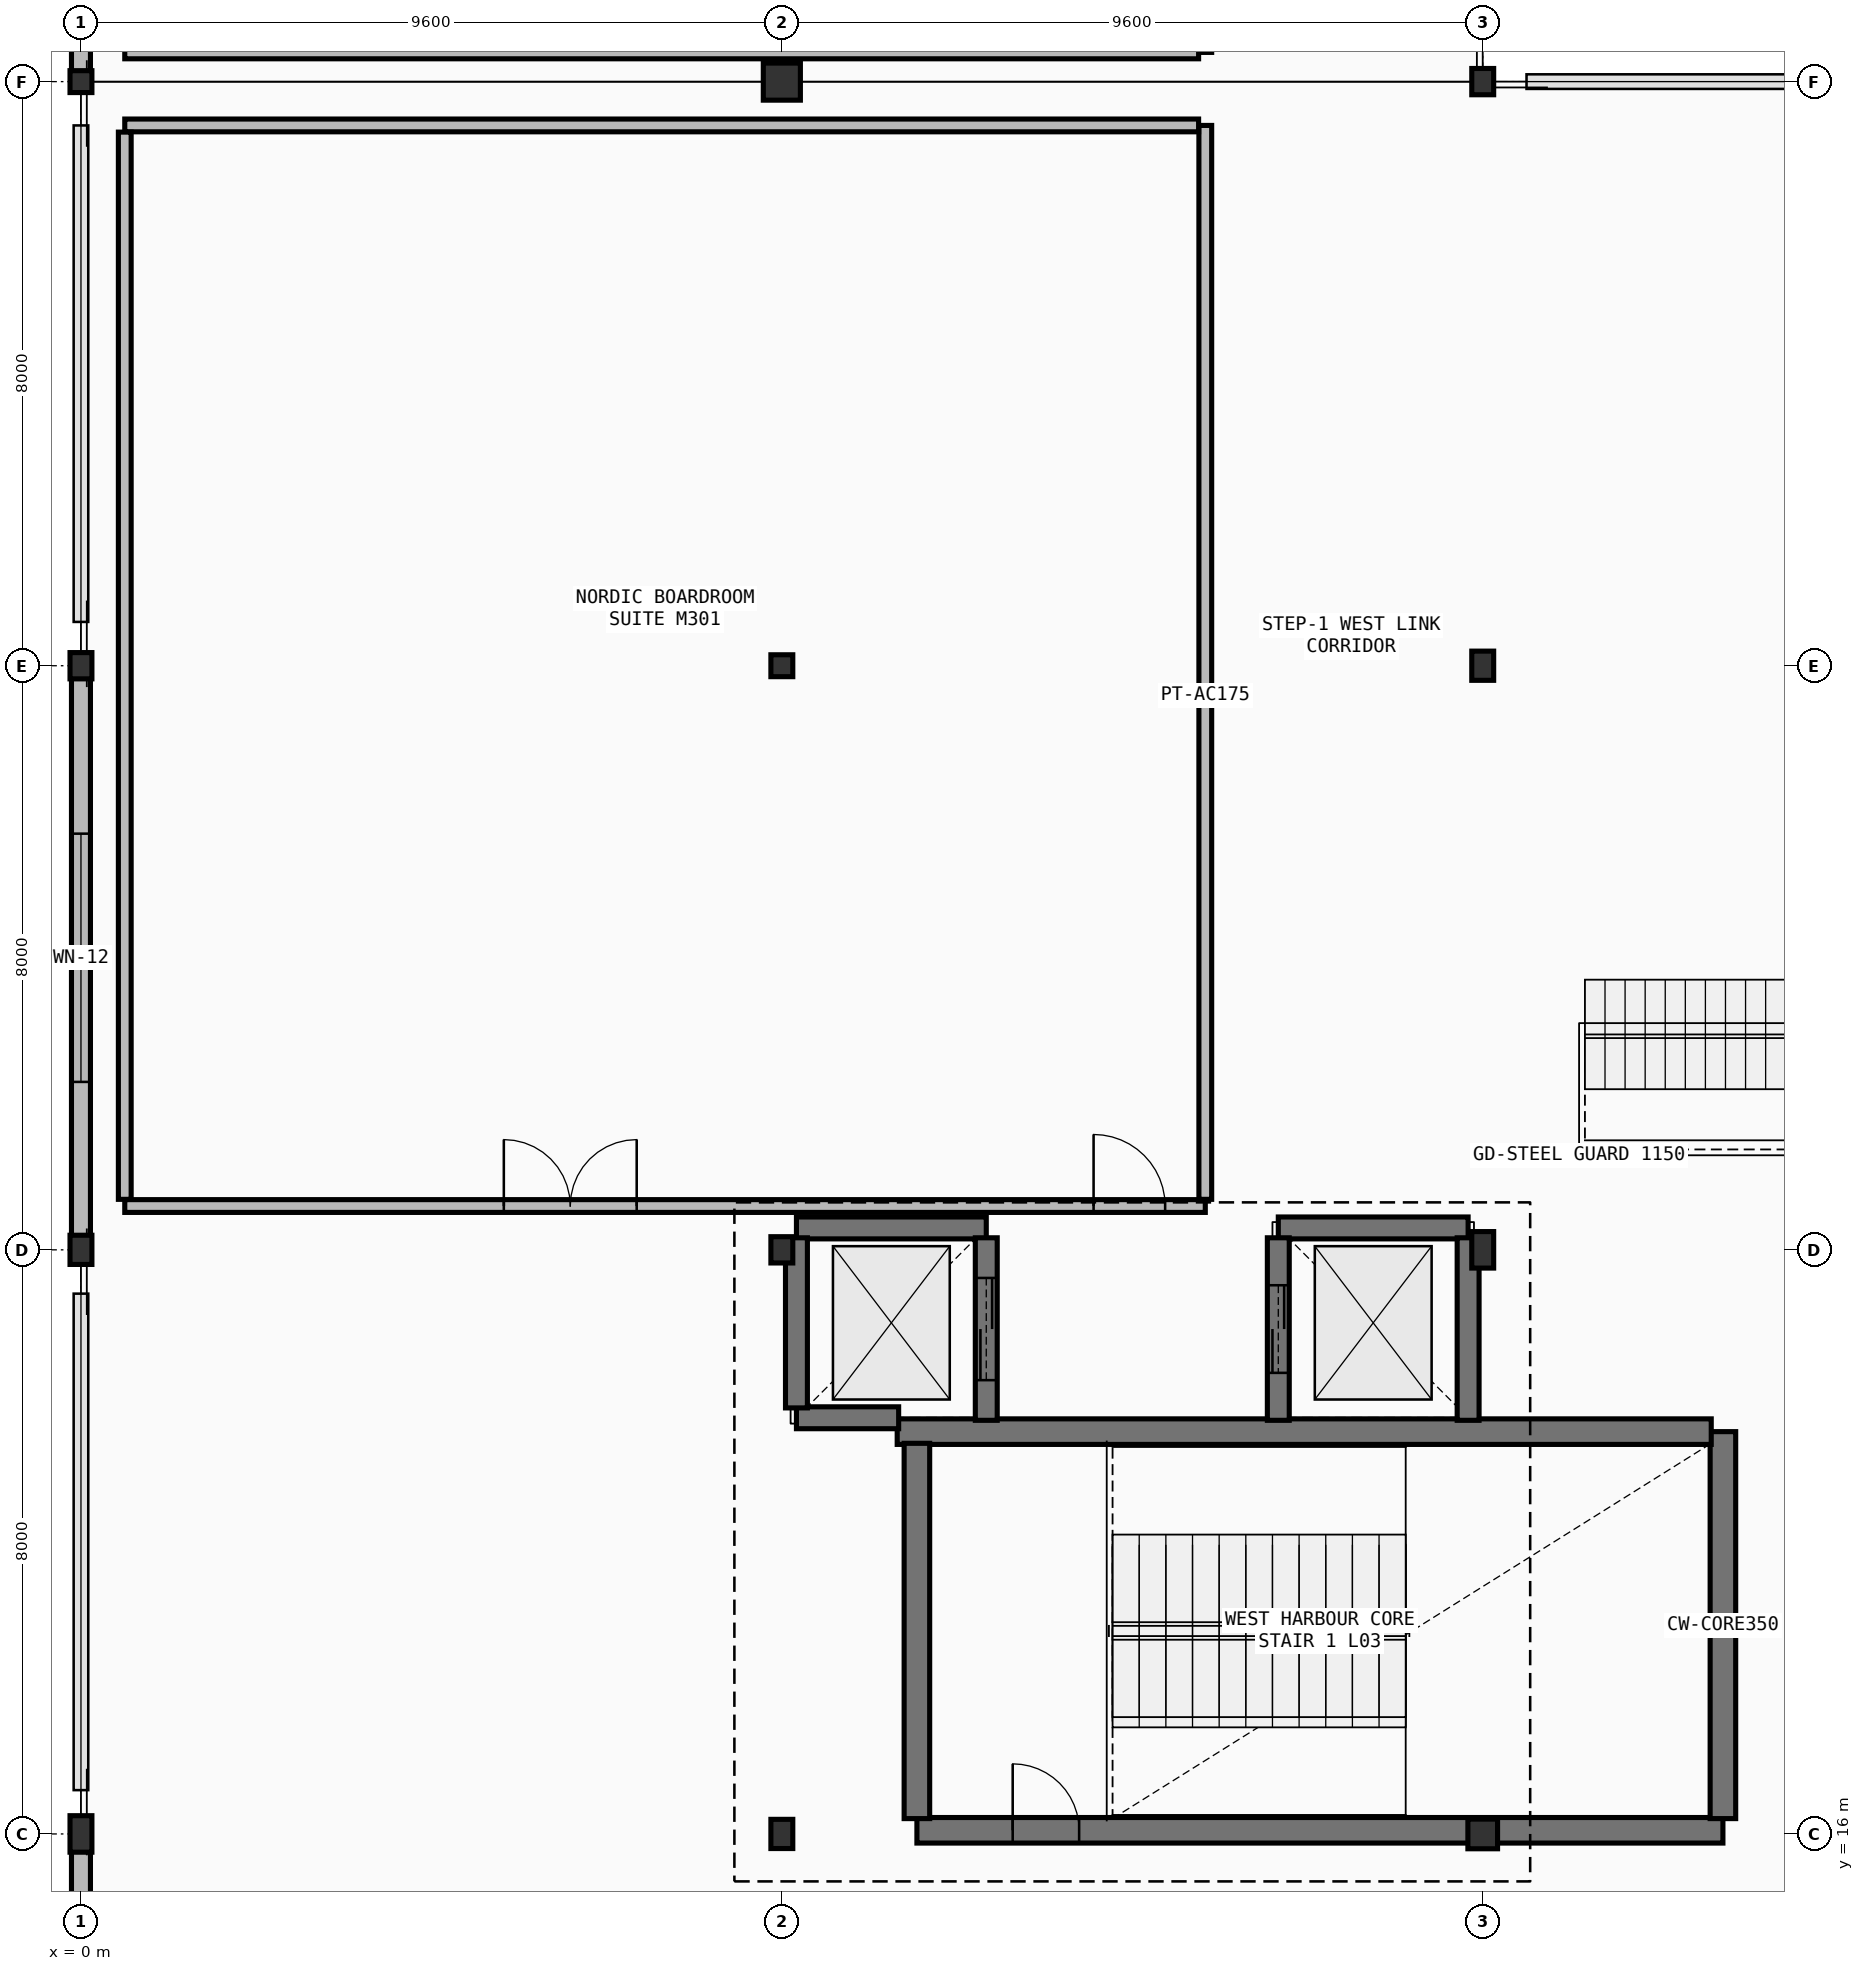
"""IFC4 building model, lengths in metres.
Left out: names, types, materials, properties, quantities, classifications, styles, units other than length and angle.
Written with IfcOpenShell. Run it as: python <this file> out.ifc"""

import sys

from ifc_helpers import new_model, si_unit, direction, frame, frame_2d, origin, origin_2d, place, context, subcontext, project, spatial, rectangle, hollow_circle, i_section, extrude, element, fill, save


model = new_model("IFC4")
c1 = context("Model", 3, precision=1e-05, world=origin(), true_north=direction((0.0, 1.0)))
c2 = subcontext(c1, "Body", "Model", "MODEL_VIEW")
j1 = project(units=[si_unit("LENGTHUNIT", "METRE"), si_unit("PLANEANGLEUNIT", "RADIAN")], contexts=[c1])
p1 = place(None, origin())
s1 = spatial("IfcSite", under=j1, at=p1, CompositionType="ELEMENT")
p2 = place(p1, origin())
s2 = spatial("IfcBuilding", under=s1, at=p2, CompositionType="ELEMENT")
p3 = place(p2, frame((0.0, 0.0, 15.9)))
s3 = spatial("IfcBuildingStorey", under=s2, at=p3, CompositionType="ELEMENT", Elevation=15.9)
p4 = place(p3, frame((0.0, 16.0, 0.0), z_axis=(0.0, 0.0, 1.0), x_axis=(1.0, 0.0, 0.0)))
e1 = element("IfcColumn", 1, at=p4, inside=s3, PredefinedType="COLUMN", context=c2, shape_type="SweptSolid", body=[
    extrude(i_section(OverallWidth=0.3, OverallDepth=0.5, WebThickness=0.014, FlangeThickness=0.028, FilletRadius=0.027, at=origin_2d()), origin(), (0.0, 0.0, 1.0), 4.5),
])
p5 = place(p3, frame((0.0, 24.0, 0.0), z_axis=(0.0, 0.0, 1.0), x_axis=(1.0, 0.0, 0.0)))
e2 = element("IfcColumn", 2, at=p5, inside=s3, PredefinedType="COLUMN", context=c2, shape_type="SweptSolid", body=[
    extrude(i_section(OverallWidth=0.3, OverallDepth=0.4, WebThickness=0.013, FlangeThickness=0.024, FilletRadius=0.027, at=origin_2d()), origin(), (0.0, 0.0, 1.0), 4.5),
])
p6 = place(p3, frame((0.0, 32.0, 0.0), z_axis=(0.0, 0.0, 1.0), x_axis=(1.0, 0.0, 0.0)))
e3 = element("IfcColumn", 3, at=p6, inside=s3, PredefinedType="COLUMN", context=c2, shape_type="SweptSolid", body=[
    extrude(i_section(OverallWidth=0.3, OverallDepth=0.36, WebThickness=0.012, FlangeThickness=0.022, FilletRadius=0.027, at=origin_2d()), origin(), (0.0, 0.0, 1.0), 4.5),
])
p7 = place(p3, frame((0.0, 40.0, 0.0), z_axis=(0.0, 0.0, 1.0), x_axis=(1.0, 0.0, 0.0)))
e4 = element("IfcColumn", 4, at=p7, inside=s3, PredefinedType="COLUMN", context=c2, shape_type="SweptSolid", body=[
    extrude(i_section(OverallWidth=0.3, OverallDepth=0.3, WebThickness=0.011, FlangeThickness=0.019, FilletRadius=0.027, at=origin_2d()), origin(), (0.0, 0.0, 1.0), 4.5),
])
p8 = place(p3, frame((9.6, 16.0, 0.0), z_axis=(0.0, 0.0, 1.0), x_axis=(1.0, 0.0, 0.0)))
e5 = element("IfcColumn", 5, at=p8, inside=s3, PredefinedType="COLUMN", context=c2, shape_type="SweptSolid", body=[
    extrude(i_section(OverallWidth=0.3, OverallDepth=0.4, WebThickness=0.013, FlangeThickness=0.024, FilletRadius=0.027, at=origin_2d()), origin(), (0.0, 0.0, 1.0), 4.5),
])
p9 = place(p3, frame((9.6, 24.0, 0.0), z_axis=(0.0, 0.0, 1.0), x_axis=(1.0, 0.0, 0.0)))
e6 = element("IfcColumn", 6, at=p9, inside=s3, PredefinedType="COLUMN", context=c2, shape_type="SweptSolid", body=[
    extrude(i_section(OverallWidth=0.3, OverallDepth=0.36, WebThickness=0.012, FlangeThickness=0.022, FilletRadius=0.027, at=origin_2d()), origin(), (0.0, 0.0, 1.0), 4.5),
])
p10 = place(p3, frame((9.6, 32.0, 0.0), z_axis=(0.0, 0.0, 1.0), x_axis=(1.0, 0.0, 0.0)))
e7 = element("IfcColumn", 7, at=p10, inside=s3, PredefinedType="COLUMN", context=c2, shape_type="SweptSolid", body=[
    extrude(i_section(OverallWidth=0.3, OverallDepth=0.3, WebThickness=0.011, FlangeThickness=0.019, FilletRadius=0.027, at=origin_2d()), origin(), (0.0, 0.0, 1.0), 4.5),
])
p11 = place(p3, frame((9.6, 40.0, 0.0), z_axis=(0.0, 0.0, 1.0), x_axis=(1.0, 0.0, 0.0)))
e8 = element("IfcColumn", 8, at=p11, inside=s3, PredefinedType="COLUMN", context=c2, shape_type="SweptSolid", body=[
    extrude(hollow_circle(Radius=0.254, WallThickness=0.025, at=origin_2d()), origin(), (0.0, 0.0, 1.0), 4.5),
])
p12 = place(p3, frame((19.2, 16.0, 0.0), z_axis=(0.0, 0.0, 1.0), x_axis=(1.0, 0.0, 0.0)))
e9 = element("IfcColumn", 9, at=p12, inside=s3, PredefinedType="COLUMN", context=c2, shape_type="SweptSolid", body=[
    extrude(hollow_circle(Radius=0.203, WallThickness=0.02, at=origin_2d()), origin(), (0.0, 0.0, 1.0), 4.5),
])
p13 = place(p3, frame((19.2, 24.0, 0.0), z_axis=(0.0, 0.0, 1.0), x_axis=(1.0, 0.0, 0.0)))
e10 = element("IfcColumn", 10, at=p13, inside=s3, PredefinedType="COLUMN", context=c2, shape_type="SweptSolid", body=[
    extrude(i_section(OverallWidth=0.3, OverallDepth=0.5, WebThickness=0.014, FlangeThickness=0.028, FilletRadius=0.027, at=origin_2d()), origin(), (0.0, 0.0, 1.0), 4.5),
])
p14 = place(p3, frame((19.2, 32.0, 0.0), z_axis=(0.0, 0.0, 1.0), x_axis=(1.0, 0.0, 0.0)))
e11 = element("IfcColumn", 11, at=p14, inside=s3, PredefinedType="COLUMN", context=c2, shape_type="SweptSolid", body=[
    extrude(i_section(OverallWidth=0.3, OverallDepth=0.4, WebThickness=0.013, FlangeThickness=0.024, FilletRadius=0.027, at=origin_2d()), origin(), (0.0, 0.0, 1.0), 4.5),
])
p15 = place(p3, frame((19.2, 40.0, 0.0), z_axis=(0.0, 0.0, 1.0), x_axis=(1.0, 0.0, 0.0)))
e12 = element("IfcColumn", 12, at=p15, inside=s3, PredefinedType="COLUMN", context=c2, shape_type="SweptSolid", body=[
    extrude(i_section(OverallWidth=0.3, OverallDepth=0.36, WebThickness=0.012, FlangeThickness=0.022, FilletRadius=0.027, at=origin_2d()), origin(), (0.0, 0.0, 1.0), 4.5),
])
p16 = place(p3, frame((0.0, 8.0, 0.0), z_axis=(0.0, 0.0, 1.0), x_axis=(0.0, 1.0, 0.0)))
e13 = element("IfcWall", 13, at=p16, inside=s3, PredefinedType="STANDARD", context=c2, shape_type="SweptSolid", body=[
    extrude(rectangle(XDim=8.0, YDim=0.26, at=frame_2d((4.0, 0.0))), origin(), (0.0, 0.0, 1.0), 3.796),
])
p17 = place(p16, frame((2.4, 0.0, 0.9)))
e14 = element("IfcOpeningElement", 14, at=p17, cuts=e13, PredefinedType="OPENING", context=c2, shape_type="SweptSolid", body=[
    extrude(rectangle(XDim=3.2, YDim=2.3, at=frame_2d((1.6, 1.15))), frame((0.0, 0.14, 0.0), z_axis=(0.0, -1.0, 0.0), x_axis=(1.0, 0.0, 0.0)), (0.0, 0.0, 1.0), 0.28),
])
p18 = place(p3, frame((0.0, 24.0, 0.0), z_axis=(0.0, 0.0, 1.0), x_axis=(0.0, 1.0, 0.0)))
e15 = element("IfcWall", 15, at=p18, inside=s3, PredefinedType="STANDARD", context=c2, shape_type="SweptSolid", body=[
    extrude(rectangle(XDim=8.0, YDim=0.26, at=frame_2d((4.0, 0.0))), origin(), (0.0, 0.0, 1.0), 3.796),
])
p19 = place(p18, frame((2.3, 0.0, 0.9)))
e16 = element("IfcOpeningElement", 16, at=p19, cuts=e15, PredefinedType="OPENING", context=c2, shape_type="SweptSolid", body=[
    extrude(rectangle(XDim=3.4, YDim=2.3, at=frame_2d((1.7, 1.15))), frame((0.0, 0.14, 0.0), z_axis=(0.0, -1.0, 0.0), x_axis=(1.0, 0.0, 0.0)), (0.0, 0.0, 1.0), 0.28),
])
p20 = place(p3, frame((0.0, 40.0, 0.0), z_axis=(0.0, 0.0, 1.0), x_axis=(0.0, 1.0, 0.0)))
e17 = element("IfcWall", 17, at=p20, inside=s3, PredefinedType="STANDARD", context=c2, shape_type="SweptSolid", body=[
    extrude(rectangle(XDim=8.0, YDim=0.26, at=frame_2d((4.0, 0.0))), origin(), (0.0, 0.0, 1.0), 3.355),
])
p21 = place(p20, frame((2.2, 0.0, 0.9)))
e18 = element("IfcOpeningElement", 18, at=p21, cuts=e17, PredefinedType="OPENING", context=c2, shape_type="SweptSolid", body=[
    extrude(rectangle(XDim=3.6, YDim=2.35, at=frame_2d((1.8, 1.175))), frame((0.0, 0.14, 0.0), z_axis=(0.0, -1.0, 0.0), x_axis=(1.0, 0.0, 0.0)), (0.0, 0.0, 1.0), 0.28),
])
p22 = place(p3, frame((11.45, 16.05, 0.0), z_axis=(0.0, 0.0, 1.0), x_axis=(1.0, 0.0, 0.0)))
e19 = element("IfcWall", 19, at=p22, inside=s3, PredefinedType="SHEAR", context=c2, shape_type="SweptSolid", body=[
    extrude(rectangle(XDim=11.04, YDim=0.35, at=frame_2d((5.52, 0.0))), origin(), (0.0, 0.0, 1.0), 4.276),
])
p23 = place(p22, frame((1.312, 0.0, 0.0)))
e20 = element("IfcOpeningElement", 20, at=p23, cuts=e19, PredefinedType="OPENING", context=c2, shape_type="SweptSolid", body=[
    extrude(rectangle(XDim=0.91, YDim=2.08, at=frame_2d((0.455, 1.04))), frame((0.0, 0.185, 0.0), z_axis=(0.0, -1.0, 0.0), x_axis=(1.0, 0.0, 0.0)), (0.0, 0.0, 1.0), 0.37),
])
p24 = place(p3, frame((22.49, 16.21, 0.0), z_axis=(0.0, 0.0, 1.0), x_axis=(0.0, 1.0, 0.0)))
e21 = element("IfcWall", 21, at=p24, inside=s3, PredefinedType="SHEAR", context=c2, shape_type="SweptSolid", body=[
    extrude(rectangle(XDim=5.3, YDim=0.35, at=frame_2d((2.65, 0.0))), origin(), (0.0, 0.0, 1.0), 4.276),
])
p25 = place(p3, frame((22.33, 21.51, 0.0), z_axis=(0.0, 0.0, 1.0), x_axis=(-1.0, 0.0, 0.0)))
e22 = element("IfcWall", 22, at=p25, inside=s3, PredefinedType="SHEAR", context=c2, shape_type="SweptSolid", body=[
    extrude(rectangle(XDim=11.15, YDim=0.35, at=frame_2d((5.575, 0.0))), origin(), (0.0, 0.0, 1.0), 4.276),
])
p26 = place(p3, frame((11.45, 21.35, 0.0), z_axis=(0.0, 0.0, 1.0), x_axis=(0.0, -1.0, 0.0)))
e23 = element("IfcWall", 23, at=p26, inside=s3, PredefinedType="SHEAR", context=c2, shape_type="SweptSolid", body=[
    extrude(rectangle(XDim=5.14, YDim=0.35, at=frame_2d((2.57, 0.0))), origin(), (0.0, 0.0, 1.0), 4.276),
])
p27 = place(p3, frame((12.4, 24.3, 0.0), z_axis=(0.0, 0.0, 1.0), x_axis=(-1.0, 0.0, 0.0)))
e24 = element("IfcWall", 24, at=p27, inside=s3, PredefinedType="SHEAR", context=c2, shape_type="SweptSolid", body=[
    extrude(rectangle(XDim=2.6, YDim=0.3, at=frame_2d((1.3, 0.0))), origin(), (0.0, 0.0, 1.0), 4.276),
])
p28 = place(p3, frame((9.8, 21.7, 0.0), z_axis=(0.0, 0.0, 1.0), x_axis=(1.0, 0.0, 0.0)))
e25 = element("IfcWall", 25, at=p28, inside=s3, PredefinedType="SHEAR", context=c2, shape_type="SweptSolid", body=[
    extrude(rectangle(XDim=1.4, YDim=0.3, at=frame_2d((0.7, 0.0))), origin(), (0.0, 0.0, 1.0), 4.276),
])
p29 = place(p3, frame((12.4, 21.665, 0.0), z_axis=(0.0, 0.0, 1.0), x_axis=(0.0, 1.0, 0.0)))
e26 = element("IfcWall", 26, at=p29, inside=s3, PredefinedType="SHEAR", context=c2, shape_type="SweptSolid", body=[
    extrude(rectangle(XDim=2.5, YDim=0.3, at=frame_2d((1.25, 0.0))), origin(), (0.0, 0.0, 1.0), 4.276),
])
p30 = place(p29, frame((0.55, 0.0, 0.0)))
e27 = element("IfcOpeningElement", 27, at=p30, cuts=e26, PredefinedType="OPENING", context=c2, shape_type="SweptSolid", body=[
    extrude(rectangle(XDim=1.4, YDim=2.26, at=frame_2d((0.7, 1.13))), frame((0.0, 0.16, 0.0), z_axis=(0.0, -1.0, 0.0), x_axis=(1.0, 0.0, 0.0)), (0.0, 0.0, 1.0), 0.32),
])
p31 = place(p3, frame((9.8, 24.165, 0.0), z_axis=(0.0, 0.0, 1.0), x_axis=(0.0, -1.0, 0.0)))
e28 = element("IfcWall", 28, at=p31, inside=s3, PredefinedType="SHEAR", context=c2, shape_type="SweptSolid", body=[
    extrude(rectangle(XDim=2.33, YDim=0.3, at=frame_2d((1.165, 0.0))), origin(), (0.0, 0.0, 1.0), 4.276),
])
p32 = place(p3, frame((19.0, 24.3, 0.0), z_axis=(0.0, 0.0, 1.0), x_axis=(-1.0, 0.0, 0.0)))
e29 = element("IfcWall", 29, at=p32, inside=s3, PredefinedType="SHEAR", context=c2, shape_type="SweptSolid", body=[
    extrude(rectangle(XDim=2.6, YDim=0.3, at=frame_2d((1.3, 0.0))), origin(), (0.0, 0.0, 1.0), 4.276),
])
p33 = place(p3, frame((19.0, 21.665, 0.0), z_axis=(0.0, 0.0, 1.0), x_axis=(0.0, 1.0, 0.0)))
e30 = element("IfcWall", 30, at=p33, inside=s3, PredefinedType="SHEAR", context=c2, shape_type="SweptSolid", body=[
    extrude(rectangle(XDim=2.5, YDim=0.3, at=frame_2d((1.25, 0.0))), origin(), (0.0, 0.0, 1.0), 4.276),
])
p34 = place(p3, frame((16.4, 24.165, 0.0), z_axis=(0.0, 0.0, 1.0), x_axis=(0.0, -1.0, 0.0)))
e31 = element("IfcWall", 31, at=p34, inside=s3, PredefinedType="SHEAR", context=c2, shape_type="SweptSolid", body=[
    extrude(rectangle(XDim=2.5, YDim=0.3, at=frame_2d((1.25, 0.0))), origin(), (0.0, 0.0, 1.0), 4.276),
])
p35 = place(p34, frame((0.65, 0.0, 0.0)))
e32 = element("IfcOpeningElement", 32, at=p35, cuts=e31, PredefinedType="OPENING", context=c2, shape_type="SweptSolid", body=[
    extrude(rectangle(XDim=1.2, YDim=2.2, at=frame_2d((0.6, 1.1))), frame((0.0, 0.16, 0.0), z_axis=(0.0, -1.0, 0.0), x_axis=(1.0, 0.0, 0.0)), (0.0, 0.0, 1.0), 0.32),
])
p36 = place(p3, frame((0.6, 24.6, 0.0), z_axis=(0.0, 0.0, 1.0), x_axis=(1.0, 0.0, 0.0)))
e33 = element("IfcWall", 33, at=p36, inside=s3, PredefinedType="PARTITIONING", context=c2, shape_type="SweptSolid", body=[
    extrude(rectangle(XDim=14.8, YDim=0.175, at=frame_2d((7.4, 0.0))), origin(), (0.0, 0.0, 1.0), 3.746),
])
p37 = place(p36, frame((5.192, 0.0, 0.0)))
e34 = element("IfcOpeningElement", 34, at=p37, cuts=e33, PredefinedType="OPENING", context=c2, shape_type="SweptSolid", body=[
    extrude(rectangle(XDim=1.82, YDim=2.26, at=frame_2d((0.91, 1.13))), frame((0.0, 0.097, 0.0), z_axis=(0.0, -1.0, 0.0), x_axis=(1.0, 0.0, 0.0)), (0.0, 0.0, 1.0), 0.195),
])
p38 = place(p36, frame((13.27, 0.0, 0.0)))
e35 = element("IfcOpeningElement", 35, at=p38, cuts=e33, PredefinedType="OPENING", context=c2, shape_type="SweptSolid", body=[
    extrude(rectangle(XDim=0.98, YDim=2.2, at=frame_2d((0.49, 1.1))), frame((0.0, 0.097, 0.0), z_axis=(0.0, -1.0, 0.0), x_axis=(1.0, 0.0, 0.0)), (0.0, 0.0, 1.0), 0.195),
])
p39 = place(p3, frame((15.4, 24.691, 0.0), z_axis=(0.0, 0.0, 1.0), x_axis=(0.0, 1.0, 0.0)))
e36 = element("IfcWall", 36, at=p39, inside=s3, PredefinedType="PARTITIONING", context=c2, shape_type="SweptSolid", body=[
    extrude(rectangle(XDim=14.708, YDim=0.175, at=frame_2d((7.354, 0.0))), origin(), (0.0, 0.0, 1.0), 3.696),
])
p40 = place(p3, frame((15.309, 39.4, 0.0), z_axis=(0.0, 0.0, 1.0), x_axis=(-1.0, 0.0, 0.0)))
e37 = element("IfcWall", 37, at=p40, inside=s3, PredefinedType="PARTITIONING", context=c2, shape_type="SweptSolid", body=[
    extrude(rectangle(XDim=14.708, YDim=0.175, at=frame_2d((7.354, 0.0))), origin(), (0.0, 0.0, 1.0), 3.646),
])
p41 = place(p3, frame((0.6, 39.309, 0.0), z_axis=(0.0, 0.0, 1.0), x_axis=(0.0, -1.0, 0.0)))
e38 = element("IfcWall", 38, at=p41, inside=s3, PredefinedType="PARTITIONING", context=c2, shape_type="SweptSolid", body=[
    extrude(rectangle(XDim=14.617, YDim=0.175, at=frame_2d((7.309, 0.0))), origin(), (0.0, 0.0, 1.0), 3.646),
])
p42 = place(p3, frame((0.6, 40.4, 0.0), z_axis=(0.0, 0.0, 1.0), x_axis=(1.0, 0.0, 0.0)))
e39 = element("IfcWall", 39, at=p42, inside=s3, PredefinedType="PARTITIONING", context=c2, shape_type="SweptSolid", body=[
    extrude(rectangle(XDim=14.708, YDim=0.175, at=frame_2d((7.354, 0.0))), origin(), (0.0, 0.0, 1.0), 3.255),
])
p43 = place(p19, origin())
e40 = element("IfcWindow", 40, at=p43, inside=s3, PartitioningType="SINGLE_PANEL", PredefinedType="WINDOW", context=c2, shape_type="SweptSolid", body=[
    extrude(rectangle(XDim=3.4, YDim=2.3, at=frame_2d((1.7, 1.15))), frame((0.0, 0.03, 0.0), z_axis=(0.0, -1.0, 0.0), x_axis=(1.0, 0.0, 0.0)), (0.0, 0.0, 1.0), 0.06),
])
fill(e16, e40)
p44 = place(p23, origin())
e41 = element("IfcDoor", 41, at=p44, inside=s3, OperationType="SINGLE_SWING_LEFT", PredefinedType="DOOR", context=c2, shape_type="SweptSolid", body=[
    extrude(rectangle(XDim=0.91, YDim=2.08, at=frame_2d((0.455, 1.04))), frame((0.0, 0.025, 0.0), z_axis=(0.0, -1.0, 0.0), x_axis=(1.0, 0.0, 0.0)), (0.0, 0.0, 1.0), 0.05),
])
fill(e20, e41)
p45 = place(p30, origin())
e42 = element("IfcDoor", 42, at=p45, inside=s3, OperationType="DOUBLE_DOOR_SLIDING", PredefinedType="DOOR", context=c2, shape_type="SweptSolid", body=[
    extrude(rectangle(XDim=1.4, YDim=2.26, at=frame_2d((0.7, 1.13))), frame((0.0, 0.025, 0.0), z_axis=(0.0, -1.0, 0.0), x_axis=(1.0, 0.0, 0.0)), (0.0, 0.0, 1.0), 0.05),
])
fill(e27, e42)
p46 = place(p35, origin())
e43 = element("IfcDoor", 43, at=p46, inside=s3, OperationType="DOUBLE_DOOR_SLIDING", PredefinedType="DOOR", context=c2, shape_type="SweptSolid", body=[
    extrude(rectangle(XDim=1.2, YDim=2.2, at=frame_2d((0.6, 1.1))), frame((0.0, 0.025, 0.0), z_axis=(0.0, -1.0, 0.0), x_axis=(1.0, 0.0, 0.0)), (0.0, 0.0, 1.0), 0.05),
])
fill(e32, e43)
p47 = place(p37, origin())
e44 = element("IfcDoor", 44, at=p47, inside=s3, OperationType="DOUBLE_DOOR_SINGLE_SWING", PredefinedType="DOOR", context=c2, shape_type="SweptSolid", body=[
    extrude(rectangle(XDim=1.82, YDim=2.26, at=frame_2d((0.91, 1.13))), frame((0.0, 0.025, 0.0), z_axis=(0.0, -1.0, 0.0), x_axis=(1.0, 0.0, 0.0)), (0.0, 0.0, 1.0), 0.05),
])
fill(e34, e44)
p48 = place(p38, origin())
e45 = element("IfcDoor", 45, at=p48, inside=s3, OperationType="SINGLE_SWING_RIGHT", PredefinedType="DOOR", context=c2, shape_type="SweptSolid", body=[
    extrude(rectangle(XDim=0.98, YDim=2.2, at=frame_2d((0.49, 1.1))), frame((0.0, 0.025, 0.0), z_axis=(0.0, -1.0, 0.0), x_axis=(1.0, 0.0, 0.0)), (0.0, 0.0, 1.0), 0.05),
])
fill(e35, e45)
save(model, sys.argv[1])
